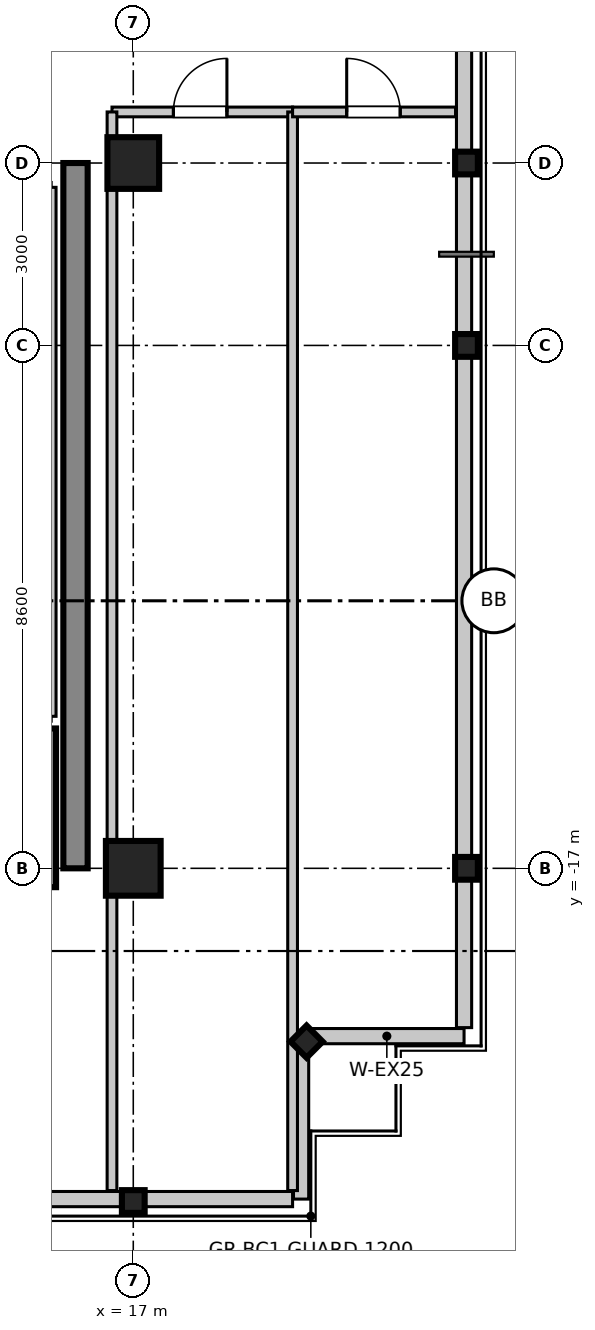
"""IFC4 building model, lengths in metres.
Left out: names, types, materials, properties, quantities, classifications, styles, units other than length and angle.
Written with IfcOpenShell. Run it as: python <this file> out.ifc"""

import sys

from ifc_helpers import new_model, si_unit, direction, frame, frame_2d, origin, origin_2d, place, context, subcontext, project, spatial, rectangle, i_section, extrude, source, transform, mapped, element, fill, save


model = new_model("IFC4")
c1 = context("Model", 3, precision=1e-05, world=origin(), true_north=direction((0.0, 1.0)))
c2 = subcontext(c1, "Body", "Model", "MODEL_VIEW")
j1 = project(units=[si_unit("LENGTHUNIT", "METRE"), si_unit("PLANEANGLEUNIT", "RADIAN")], contexts=[c1])
p1 = place(None, origin())
s1 = spatial("IfcSite", under=j1, at=p1, CompositionType="ELEMENT")
p2 = place(p1, origin())
s2 = spatial("IfcBuilding", under=s1, at=p2, CompositionType="ELEMENT")
p3 = place(p2, frame((0.0, 0.0, 296.5)))
s3 = spatial("IfcBuildingStorey", under=s2, at=p3, CompositionType="ELEMENT", Elevation=296.5)
m1 = source(origin(), c2, "Body", "SweptSolid", [
    extrude(rectangle(XDim=0.9, YDim=0.9, at=origin_2d()), origin(), (0.0, 0.0, 1.0), 3.805),
])
p4 = place(p3, frame((17.0, -17.0, 0.0), z_axis=(0.0, 0.0, 1.0), x_axis=(1.0, 0.0, 0.0)))
e1 = element("IfcColumn", 1, at=p4, inside=s3, PredefinedType="COLUMN", context=c2, shape_type="MappedRepresentation", body=[
    mapped(m1, transform((0.0, 0.0, 0.0), scale=1.0)),
])
m2 = source(origin(), c2, "Body", "SweptSolid", [
    extrude(rectangle(XDim=0.85, YDim=0.85, at=origin_2d()), origin(), (0.0, 0.0, 1.0), 3.805),
])
p5 = place(p3, frame((17.0, -5.4, 0.0), z_axis=(0.0, 0.0, 1.0), x_axis=(1.0, 0.0, 0.0)))
e2 = element("IfcColumn", 2, at=p5, inside=s3, PredefinedType="PILASTER", context=c2, shape_type="MappedRepresentation", body=[
    mapped(m2, transform((0.0, 0.0, 0.0), scale=1.0)),
])
m3 = source(origin(), c2, "Body", "SweptSolid", [
    extrude(i_section(OverallWidth=0.374, OverallDepth=0.374, WebThickness=0.014, FlangeThickness=0.023, at=origin_2d()), origin(), (0.0, 0.0, 1.0), 3.805),
])
for number, where, z_axis, x_axis in (
    (3, (22.48, -17.0, 0.0), (0.0, 0.0, 1.0), (1.0, 0.0, 0.0)),
    (4, (22.48, -8.4, 0.0), (0.0, 0.0, 1.0), (1.0, 0.0, 0.0)),
    (5, (22.48, -5.4, 0.0), (0.0, 0.0, 1.0), (1.0, 0.0, 0.0)),
    (6, (17.0, -22.48, 0.0), (0.0, 0.0, 1.0), (0.0, 1.0, 0.0)),
    (7, (19.85, -19.85, 0.0), (0.0, 0.0, 1.0), (0.707, 0.707, 0.0)),
):
    element("IfcColumn", number, at=place(p3, frame(where, z_axis=z_axis, x_axis=x_axis)), inside=s3, PredefinedType="COLUMN", context=c2, shape_type="MappedRepresentation", body=[
        mapped(m3, transform((0.0, 0.0, 0.0), scale=1.0)),
    ])
m4 = source(origin(), c2, "Body", "SweptSolid", [
    extrude(rectangle(XDim=11.6, YDim=0.4, at=frame_2d((5.8, 0.0))), origin(), (0.0, 0.0, 1.0), 3.55),
])
p6 = place(p3, frame((16.05, -17.0, 0.0), z_axis=(0.0, 0.0, 1.0), x_axis=(0.0, 1.0, 0.0)))
e8 = element("IfcWall", 8, at=p6, inside=s3, PredefinedType="SHEAR", context=c2, shape_type="MappedRepresentation", body=[
    mapped(m4, transform((0.0, 0.0, 0.0), scale=1.0)),
])
m5 = source(origin(), c2, "Body", "SweptSolid", [
    extrude(rectangle(XDim=2.61, YDim=0.22, at=frame_2d((1.305, 0.0))), origin(), (0.0, 0.0, 1.0), 3.55),
])
p7 = place(p3, frame((15.62, -17.31, 0.0), z_axis=(0.0, 0.0, 1.0), x_axis=(0.0, 1.0, 0.0)))
e9 = element("IfcWall", 9, at=p7, inside=s3, PredefinedType="SHEAR", context=c2, shape_type="MappedRepresentation", body=[
    mapped(m5, transform((0.0, 0.0, 0.0), scale=1.0)),
])
m6 = source(origin(), c2, "Body", "SweptSolid", [
    extrude(rectangle(XDim=27.34, YDim=0.25, at=frame_2d((13.67, 0.0))), origin(), (0.0, 0.0, 1.0), 2.89),
])
p8 = place(p3, frame((-7.72, -22.44, 0.0), z_axis=(0.0, 0.0, 1.0), x_axis=(1.0, 0.0, 0.0)))
e10 = element("IfcWall", 10, at=p8, inside=s3, PredefinedType="STANDARD", context=c2, shape_type="MappedRepresentation", body=[
    mapped(m6, transform((0.0, 0.0, 0.0), scale=1.0)),
])
m7 = source(origin(), c2, "Body", "SweptSolid", [
    extrude(rectangle(XDim=2.54, YDim=0.25, at=frame_2d((1.27, 0.0))), origin(), (0.0, 0.0, 1.0), 2.89),
])
for number, where, z_axis, x_axis in (
    (11, (19.76, -22.44, 0.0), (0.0, 0.0, 1.0), (0.0, 1.0, 0.0)),
    (12, (19.9, -19.76, 0.0), (0.0, 0.0, 1.0), (1.0, 0.0, 0.0)),
):
    element("IfcWall", number, at=place(p3, frame(where, z_axis=z_axis, x_axis=x_axis)), inside=s3, PredefinedType="STANDARD", context=c2, shape_type="MappedRepresentation", body=[
        mapped(m7, transform((0.0, 0.0, 0.0), scale=1.0)),
    ])
m8 = source(origin(), c2, "Body", "SweptSolid", [
    extrude(rectangle(XDim=16.12, YDim=0.25, at=frame_2d((8.06, 0.0))), origin(), (0.0, 0.0, 1.0), 2.89),
])
p9 = place(p3, frame((22.44, -19.62, 0.0), z_axis=(0.0, 0.0, 1.0), x_axis=(0.0, 1.0, 0.0)))
e13 = element("IfcWall", 13, at=p9, inside=s3, PredefinedType="STANDARD", context=c2, shape_type="MappedRepresentation", body=[
    mapped(m8, transform((0.0, 0.0, 0.0), scale=1.0)),
])
m9 = source(origin(), c2, "Body", "SweptSolid", [
    extrude(rectangle(XDim=8.7, YDim=0.16, at=frame_2d((4.35, 0.0))), origin(), (0.0, 0.0, 1.0), 2.89),
])
p10 = place(p3, frame((15.65, -14.5, 0.0), z_axis=(0.0, 0.0, 1.0), x_axis=(0.0, 1.0, 0.0)))
e14 = element("IfcWall", 14, at=p10, inside=s3, PredefinedType="PARTITIONING", context=c2, shape_type="MappedRepresentation", body=[
    mapped(m9, transform((0.0, 0.0, 0.0), scale=1.0)),
])
m10 = source(origin(), c2, "Body", "SweptSolid", [
    extrude(rectangle(XDim=2.97, YDim=0.16, at=frame_2d((1.485, 0.0))), origin(), (0.0, 0.0, 1.0), 2.89),
])
p11 = place(p3, frame((16.65, -4.56, 0.0), z_axis=(0.0, 0.0, 1.0), x_axis=(1.0, 0.0, 0.0)))
e15 = element("IfcWall", 15, at=p11, inside=s3, PredefinedType="PARTITIONING", context=c2, shape_type="MappedRepresentation", body=[
    mapped(m10, transform((0.0, 0.0, 0.0), scale=1.0)),
])
p12 = place(p11, frame((1.01, 0.0, 0.0)))
e16 = element("IfcOpeningElement", 16, at=p12, cuts=e15, PredefinedType="OPENING", context=c2, shape_type="SweptSolid", body=[
    extrude(rectangle(XDim=0.88, YDim=2.1, at=frame_2d((0.44, 1.05))), frame((0.0, 0.09, 0.0), z_axis=(0.0, -1.0, 0.0), x_axis=(1.0, 0.0, 0.0)), (0.0, 0.0, 1.0), 0.18),
])
m11 = source(origin(), c2, "Body", "SweptSolid", [
    extrude(rectangle(XDim=17.74, YDim=0.16, at=frame_2d((8.87, 0.0))), origin(), (0.0, 0.0, 1.0), 2.89),
])
for number, where, z_axis, x_axis in (
    (17, (16.65, -22.3, 0.0), (0.0, 0.0, 1.0), (0.0, 1.0, 0.0)),
    (18, (19.62, -22.3, 0.0), (0.0, 0.0, 1.0), (0.0, 1.0, 0.0)),
):
    element("IfcWall", number, at=place(p3, frame(where, z_axis=z_axis, x_axis=x_axis)), inside=s3, PredefinedType="PARTITIONING", context=c2, shape_type="MappedRepresentation", body=[
        mapped(m11, transform((0.0, 0.0, 0.0), scale=1.0)),
    ])
m12 = source(origin(), c2, "Body", "SweptSolid", [
    extrude(rectangle(XDim=2.68, YDim=0.16, at=frame_2d((1.34, 0.0))), origin(), (0.0, 0.0, 1.0), 2.89),
])
p13 = place(p3, frame((19.62, -4.56, 0.0), z_axis=(0.0, 0.0, 1.0), x_axis=(1.0, 0.0, 0.0)))
e19 = element("IfcWall", 19, at=p13, inside=s3, PredefinedType="PARTITIONING", context=c2, shape_type="MappedRepresentation", body=[
    mapped(m12, transform((0.0, 0.0, 0.0), scale=1.0)),
])
p14 = place(p13, frame((0.89, 0.0, 0.0)))
e20 = element("IfcOpeningElement", 20, at=p14, cuts=e19, PredefinedType="OPENING", context=c2, shape_type="SweptSolid", body=[
    extrude(rectangle(XDim=0.88, YDim=2.1, at=frame_2d((0.44, 1.05))), frame((0.0, 0.09, 0.0), z_axis=(0.0, -1.0, 0.0), x_axis=(1.0, 0.0, 0.0)), (0.0, 0.0, 1.0), 0.18),
])
m13 = source(origin(), c2, "Body", "SweptSolid", [
    extrude(rectangle(XDim=0.88, YDim=2.1, at=frame_2d((0.44, 1.05))), frame((0.0, 0.025, 0.0), z_axis=(0.0, -1.0, 0.0), x_axis=(1.0, 0.0, 0.0)), (0.0, 0.0, 1.0), 0.05),
])
p15 = place(p12, frame((0.88, 0.0, 0.0), z_axis=(0.0, 0.0, 1.0), x_axis=(-1.0, 0.0, 0.0)))
e21 = element("IfcDoor", 21, at=p15, inside=s3, OperationType="SINGLE_SWING_RIGHT", PredefinedType="DOOR", context=c2, shape_type="MappedRepresentation", body=[
    mapped(m13, transform((0.0, 0.0, 0.0), scale=1.0)),
])
fill(e16, e21)
p16 = place(p14, frame((0.88, 0.0, 0.0), z_axis=(0.0, 0.0, 1.0), x_axis=(-1.0, 0.0, 0.0)))
e22 = element("IfcDoor", 22, at=p16, inside=s3, OperationType="SINGLE_SWING_LEFT", PredefinedType="DOOR", context=c2, shape_type="MappedRepresentation", body=[
    mapped(m13, transform((0.0, 0.0, 0.0), scale=1.0)),
])
fill(e20, e22)
save(model, sys.argv[1])
